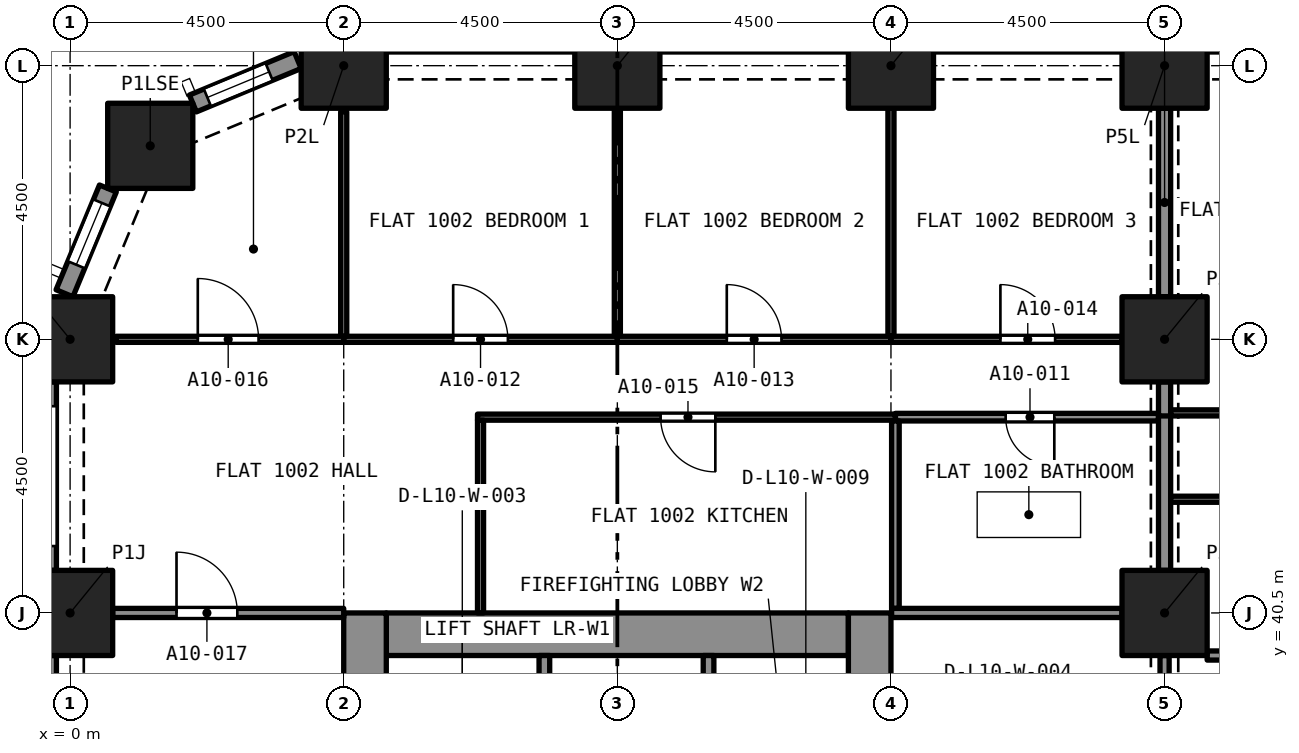
"""IFC4 building model, lengths in metres.
Left out: names, types, materials, properties, quantities, classifications, styles, units other than length and angle.
Written with IfcOpenShell. Run it as: python <this file> out.ifc"""

import sys

from ifc_helpers import new_model, si_unit, direction, frame, frame_2d, origin, origin_2d, place, context, subcontext, project, spatial, rectangle, extrude, element, fill, save


model = new_model("IFC4")
c1 = context("Model", 3, precision=1e-05, world=origin(), true_north=direction((0.0, 1.0)))
c2 = subcontext(c1, "Body", "Model", "MODEL_VIEW")
j1 = project(units=[si_unit("LENGTHUNIT", "METRE"), si_unit("PLANEANGLEUNIT", "RADIAN")], contexts=[c1])
p1 = place(None, origin())
s1 = spatial("IfcSite", under=j1, at=p1, CompositionType="ELEMENT")
p2 = place(p1, origin())
s2 = spatial("IfcBuilding", under=s1, at=p2, CompositionType="ELEMENT")
p3 = place(p2, frame((0.0, 0.0, 43.2)))
s3 = spatial("IfcBuildingStorey", under=s2, at=p3, CompositionType="ELEMENT", Elevation=43.2)
for number, where, z_axis, x_axis in (
    (1, (0.0, 40.5, 0.0), (0.0, 0.0, 1.0), (1.0, 0.0, 0.0)),
    (2, (18.0, 40.5, 0.0), (0.0, 0.0, 1.0), (1.0, 0.0, 0.0)),
    (3, (0.0, 45.0, 0.0), (0.0, 0.0, 1.0), (1.0, 0.0, 0.0)),
    (4, (18.0, 45.0, 0.0), (0.0, 0.0, 1.0), (1.0, 0.0, 0.0)),
    (5, (1.318, 48.182, 0.0), (0.0, 0.0, 1.0), (1.0, 0.0, 0.0)),
    (6, (4.5, 49.5, 0.0), (0.0, 0.0, 1.0), (1.0, 0.0, 0.0)),
    (7, (9.0, 49.5, 0.0), (0.0, 0.0, 1.0), (1.0, 0.0, 0.0)),
    (8, (13.5, 49.5, 0.0), (0.0, 0.0, 1.0), (1.0, 0.0, 0.0)),
    (9, (18.0, 49.5, 0.0), (0.0, 0.0, 1.0), (1.0, 0.0, 0.0)),
):
    element("IfcColumn", number, at=place(p3, frame(where, z_axis=z_axis, x_axis=x_axis)), inside=s3, PredefinedType="COLUMN", context=c2, shape_type="SweptSolid", body=[
        extrude(rectangle(XDim=1.4, YDim=1.4, at=origin_2d()), origin(), (0.0, 0.0, 1.0), 3.2),
    ])
p4 = place(p3, frame((5.2, 40.15, 0.0), z_axis=(0.0, 0.0, 1.0), x_axis=(1.0, 0.0, 0.0)))
e10 = element("IfcWall", 10, at=p4, inside=s3, PredefinedType="SOLIDWALL", context=c2, shape_type="SweptSolid", body=[
    extrude(rectangle(XDim=7.6, YDim=0.7, at=frame_2d((3.8, 0.0))), origin(), (0.0, 0.0, 1.0), 3.2),
])
p5 = place(p3, frame((4.85, 27.0, 0.0), z_axis=(0.0, 0.0, 1.0), x_axis=(0.0, 1.0, 0.0)))
e11 = element("IfcWall", 11, at=p5, inside=s3, PredefinedType="SOLIDWALL", context=c2, shape_type="SweptSolid", body=[
    extrude(rectangle(XDim=13.5, YDim=0.7, at=frame_2d((6.75, 0.0))), origin(), (0.0, 0.0, 1.0), 3.2),
])
p6 = place(p5, frame((8.95, 0.0, 0.0)))
e12 = element("IfcOpeningElement", 12, at=p6, cuts=e11, PredefinedType="OPENING", context=c2, shape_type="SweptSolid", body=[
    extrude(rectangle(XDim=1.2, YDim=2.1, at=frame_2d((0.6, 1.05))), frame((0.0, 0.36, 0.0), z_axis=(0.0, -1.0, 0.0), x_axis=(1.0, 0.0, 0.0)), (0.0, 0.0, 1.0), 0.72),
])
p7 = place(p3, frame((13.15, 27.0, 0.0), z_axis=(0.0, 0.0, 1.0), x_axis=(0.0, 1.0, 0.0)))
e13 = element("IfcWall", 13, at=p7, inside=s3, PredefinedType="SOLIDWALL", context=c2, shape_type="SweptSolid", body=[
    extrude(rectangle(XDim=13.5, YDim=0.7, at=frame_2d((6.75, 0.0))), origin(), (0.0, 0.0, 1.0), 3.2),
])
p8 = place(p7, frame((11.1, 0.0, 0.0)))
e14 = element("IfcOpeningElement", 14, at=p8, cuts=e13, PredefinedType="OPENING", context=c2, shape_type="SweptSolid", body=[
    extrude(rectangle(XDim=1.1, YDim=2.1, at=frame_2d((0.55, 1.05))), frame((0.0, 0.36, 0.0), z_axis=(0.0, -1.0, 0.0), x_axis=(1.0, 0.0, 0.0)), (0.0, 0.0, 1.0), 0.72),
])
p9 = place(p7, frame((8.95, 0.0, 0.0)))
e15 = element("IfcOpeningElement", 15, at=p9, cuts=e13, PredefinedType="OPENING", context=c2, shape_type="SweptSolid", body=[
    extrude(rectangle(XDim=1.2, YDim=2.1, at=frame_2d((0.6, 1.05))), frame((0.0, 0.36, 0.0), z_axis=(0.0, -1.0, 0.0), x_axis=(1.0, 0.0, 0.0)), (0.0, 0.0, 1.0), 0.72),
])
p10 = place(p3, frame((2.02, 48.878, 0.0), z_axis=(0.0, 0.0, 1.0), x_axis=(0.923903565336, 0.38262540684, 0.0)))
e16 = element("IfcWall", 16, at=p10, inside=s3, PredefinedType="SOLIDWALL", context=c2, shape_type="SweptSolid", body=[
    extrude(rectangle(XDim=1.865, YDim=0.3, at=frame_2d((0.933, 0.0))), origin(), (0.0, 0.0, 1.0), 3.2),
])
p11 = place(p10, frame((0.258, 0.0, 0.45)))
e17 = element("IfcOpeningElement", 17, at=p11, cuts=e16, PredefinedType="OPENING", context=c2, shape_type="SweptSolid", body=[
    extrude(rectangle(XDim=1.1, YDim=1.95, at=frame_2d((0.55, 0.975))), frame((0.0, 0.16, 0.0), z_axis=(0.0, -1.0, 0.0), x_axis=(1.0, 0.0, 0.0)), (0.0, 0.0, 1.0), 0.32),
])
p12 = place(p3, frame((-0.092, 45.757, 0.0), z_axis=(0.0, 0.0, 1.0), x_axis=(0.382737135771, 0.923857286003, 0.0)))
e18 = element("IfcWall", 18, at=p12, inside=s3, PredefinedType="SOLIDWALL", context=c2, shape_type="SweptSolid", body=[
    extrude(rectangle(XDim=1.865, YDim=0.3, at=frame_2d((0.933, 0.0))), origin(), (0.0, 0.0, 1.0), 3.2),
])
p13 = place(p12, frame((0.508, 0.0, 0.45)))
e19 = element("IfcOpeningElement", 19, at=p13, cuts=e18, PredefinedType="OPENING", context=c2, shape_type="SweptSolid", body=[
    extrude(rectangle(XDim=1.1, YDim=1.95, at=frame_2d((0.55, 0.975))), frame((0.0, 0.16, 0.0), z_axis=(0.0, -1.0, 0.0), x_axis=(1.0, 0.0, 0.0)), (0.0, 0.0, 1.0), 0.32),
])
p14 = place(p3, frame((-0.375, 41.2, 0.0), z_axis=(0.0, 0.0, 1.0), x_axis=(0.0, 1.0, 0.0)))
e20 = element("IfcWall", 20, at=p14, inside=s3, PredefinedType="SOLIDWALL", context=c2, shape_type="SweptSolid", body=[
    extrude(rectangle(XDim=3.1, YDim=0.3, at=frame_2d((1.55, 0.0))), origin(), (0.0, 0.0, 1.0), 3.2),
])
p15 = place(p14, frame((0.4, 0.0, 0.45)))
e21 = element("IfcOpeningElement", 21, at=p15, cuts=e20, PredefinedType="OPENING", context=c2, shape_type="SweptSolid", body=[
    extrude(rectangle(XDim=2.3, YDim=1.95, at=frame_2d((1.15, 0.975))), frame((0.0, 0.16, 0.0), z_axis=(0.0, -1.0, 0.0), x_axis=(1.0, 0.0, 0.0)), (0.0, 0.0, 1.0), 0.32),
])
p16 = place(p3, frame((-0.375, 36.7, 0.0), z_axis=(0.0, 0.0, 1.0), x_axis=(0.0, 1.0, 0.0)))
e22 = element("IfcWall", 22, at=p16, inside=s3, PredefinedType="SOLIDWALL", context=c2, shape_type="SweptSolid", body=[
    extrude(rectangle(XDim=3.1, YDim=0.3, at=frame_2d((1.55, 0.0))), origin(), (0.0, 0.0, 1.0), 3.2),
])
p17 = place(p16, frame((0.4, 0.0, 0.45)))
e23 = element("IfcOpeningElement", 23, at=p17, cuts=e22, PredefinedType="OPENING", context=c2, shape_type="SweptSolid", body=[
    extrude(rectangle(XDim=2.3, YDim=1.95, at=frame_2d((1.15, 0.975))), frame((0.0, 0.16, 0.0), z_axis=(0.0, -1.0, 0.0), x_axis=(1.0, 0.0, 0.0)), (0.0, 0.0, 1.0), 0.32),
])
p18 = place(p3, frame((17.9, 43.72, 0.0), z_axis=(0.0, 0.0, 1.0), x_axis=(-1.0, 0.0, 0.0)))
e24 = element("IfcWall", 24, at=p18, inside=s3, PredefinedType="PARTITIONING", context=c2, shape_type="SweptSolid", body=[
    extrude(rectangle(XDim=4.327, YDim=0.125, at=frame_2d((2.163, 0.0))), origin(), (0.0, 0.0, 1.0), 2.9),
])
p19 = place(p18, frame((1.713, 0.0, 0.0)))
e25 = element("IfcOpeningElement", 25, at=p19, cuts=e24, PredefinedType="OPENING", context=c2, shape_type="SweptSolid", body=[
    extrude(rectangle(XDim=0.8, YDim=2.1, at=frame_2d((0.4, 1.05))), frame((0.0, 0.073, 0.0), z_axis=(0.0, -1.0, 0.0), x_axis=(1.0, 0.0, 0.0)), (0.0, 0.0, 1.0), 0.145),
])
p20 = place(p3, frame((13.573, 40.575, 0.0), z_axis=(0.0, 0.0, 1.0), x_axis=(0.0, 1.0, 0.0)))
e26 = element("IfcWall", 26, at=p20, inside=s3, PredefinedType="PARTITIONING", context=c2, shape_type="SweptSolid", body=[
    extrude(rectangle(XDim=3.083, YDim=0.125, at=frame_2d((1.541, 0.0))), origin(), (0.0, 0.0, 1.0), 2.9),
])
p21 = place(p3, frame((18.0, 41.2, 0.0), z_axis=(0.0, 0.0, 1.0), x_axis=(0.0, 1.0, 0.0)))
e27 = element("IfcWall", 27, at=p21, inside=s3, PredefinedType="PARTITIONING", context=c2, shape_type="SweptSolid", body=[
    extrude(rectangle(XDim=2.583, YDim=0.2, at=frame_2d((1.291, 0.0))), origin(), (0.0, 0.0, 1.0), 2.38),
])
p22 = place(p3, frame((13.511, 40.5, 0.0), z_axis=(0.0, 0.0, 1.0), x_axis=(1.0, 0.0, 0.0)))
e28 = element("IfcWall", 28, at=p22, inside=s3, PredefinedType="PARTITIONING", context=c2, shape_type="SweptSolid", body=[
    extrude(rectangle(XDim=3.789, YDim=0.15, at=frame_2d((1.895, 0.0))), origin(), (0.0, 0.0, 1.0), 2.9),
])
p23 = place(p3, frame((9.0, 45.05, 0.0), z_axis=(0.0, 0.0, 1.0), x_axis=(0.0, 1.0, 0.0)))
e29 = element("IfcWall", 29, at=p23, inside=s3, PredefinedType="PARTITIONING", context=c2, shape_type="SweptSolid", body=[
    extrude(rectangle(XDim=3.75, YDim=0.1, at=frame_2d((1.875, 0.0))), origin(), (0.0, 0.0, 1.0), 2.9),
])
p24 = place(p3, frame((4.5, 45.0, 0.0), z_axis=(0.0, 0.0, 1.0), x_axis=(1.0, 0.0, 0.0)))
e30 = element("IfcWall", 30, at=p24, inside=s3, PredefinedType="PARTITIONING", context=c2, shape_type="SweptSolid", body=[
    extrude(rectangle(XDim=4.5, YDim=0.1, at=frame_2d((2.25, 0.0))), origin(), (0.0, 0.0, 1.0), 2.9),
])
p25 = place(p24, frame((1.8, 0.0, 0.0)))
e31 = element("IfcOpeningElement", 31, at=p25, cuts=e30, PredefinedType="OPENING", context=c2, shape_type="SweptSolid", body=[
    extrude(rectangle(XDim=0.9, YDim=2.1, at=frame_2d((0.45, 1.05))), frame((0.0, 0.06, 0.0), z_axis=(0.0, -1.0, 0.0), x_axis=(1.0, 0.0, 0.0)), (0.0, 0.0, 1.0), 0.12),
])
p26 = place(p3, frame((4.5, 45.05, 0.0), z_axis=(0.0, 0.0, 1.0), x_axis=(0.0, 1.0, 0.0)))
e32 = element("IfcWall", 32, at=p26, inside=s3, PredefinedType="PARTITIONING", context=c2, shape_type="SweptSolid", body=[
    extrude(rectangle(XDim=3.692, YDim=0.1, at=frame_2d((1.846, 0.0))), origin(), (0.0, 0.0, 1.0), 2.9),
])
p27 = place(p3, frame((13.5, 45.05, 0.0), z_axis=(0.0, 0.0, 1.0), x_axis=(0.0, 1.0, 0.0)))
e33 = element("IfcWall", 33, at=p27, inside=s3, PredefinedType="PARTITIONING", context=c2, shape_type="SweptSolid", body=[
    extrude(rectangle(XDim=3.75, YDim=0.1, at=frame_2d((1.875, 0.0))), origin(), (0.0, 0.0, 1.0), 2.9),
])
p28 = place(p3, frame((9.0, 45.0, 0.0), z_axis=(0.0, 0.0, 1.0), x_axis=(1.0, 0.0, 0.0)))
e34 = element("IfcWall", 34, at=p28, inside=s3, PredefinedType="PARTITIONING", context=c2, shape_type="SweptSolid", body=[
    extrude(rectangle(XDim=4.5, YDim=0.1, at=frame_2d((2.25, 0.0))), origin(), (0.0, 0.0, 1.0), 2.9),
])
p29 = place(p28, frame((1.8, 0.0, 0.0)))
e35 = element("IfcOpeningElement", 35, at=p29, cuts=e34, PredefinedType="OPENING", context=c2, shape_type="SweptSolid", body=[
    extrude(rectangle(XDim=0.9, YDim=2.1, at=frame_2d((0.45, 1.05))), frame((0.0, 0.06, 0.0), z_axis=(0.0, -1.0, 0.0), x_axis=(1.0, 0.0, 0.0)), (0.0, 0.0, 1.0), 0.12),
])
p30 = place(p3, frame((13.5, 45.0, 0.0), z_axis=(0.0, 0.0, 1.0), x_axis=(1.0, 0.0, 0.0)))
e36 = element("IfcWall", 36, at=p30, inside=s3, PredefinedType="PARTITIONING", context=c2, shape_type="SweptSolid", body=[
    extrude(rectangle(XDim=3.8, YDim=0.1, at=frame_2d((1.9, 0.0))), origin(), (0.0, 0.0, 1.0), 2.9),
])
p31 = place(p30, frame((1.8, 0.0, 0.0)))
e37 = element("IfcOpeningElement", 37, at=p31, cuts=e36, PredefinedType="OPENING", context=c2, shape_type="SweptSolid", body=[
    extrude(rectangle(XDim=0.9, YDim=2.1, at=frame_2d((0.45, 1.05))), frame((0.0, 0.06, 0.0), z_axis=(0.0, -1.0, 0.0), x_axis=(1.0, 0.0, 0.0)), (0.0, 0.0, 1.0), 0.12),
])
p32 = place(p3, frame((18.0, 45.7, 0.0), z_axis=(0.0, 0.0, 1.0), x_axis=(0.0, 1.0, 0.0)))
e38 = element("IfcWall", 38, at=p32, inside=s3, PredefinedType="PARTITIONING", context=c2, shape_type="SweptSolid", body=[
    extrude(rectangle(XDim=3.1, YDim=0.2, at=frame_2d((1.55, 0.0))), origin(), (0.0, 0.0, 1.0), 2.38),
])
p33 = place(p3, frame((13.573, 43.72, 0.0), z_axis=(0.0, 0.0, 1.0), x_axis=(-1.0, 0.0, 0.0)))
e39 = element("IfcWall", 39, at=p33, inside=s3, PredefinedType="PARTITIONING", context=c2, shape_type="SweptSolid", body=[
    extrude(rectangle(XDim=6.873, YDim=0.1, at=frame_2d((3.437, 0.0))), origin(), (0.0, 0.0, 1.0), 2.9),
])
p34 = place(p33, frame((2.962, 0.0, 0.0)))
e40 = element("IfcOpeningElement", 40, at=p34, cuts=e39, PredefinedType="OPENING", context=c2, shape_type="SweptSolid", body=[
    extrude(rectangle(XDim=0.9, YDim=2.1, at=frame_2d((0.45, 1.05))), frame((0.0, 0.06, 0.0), z_axis=(0.0, -1.0, 0.0), x_axis=(1.0, 0.0, 0.0)), (0.0, 0.0, 1.0), 0.12),
])
p35 = place(p3, frame((6.75, 40.5, 0.0), z_axis=(0.0, 0.0, 1.0), x_axis=(0.0, 1.0, 0.0)))
e41 = element("IfcWall", 41, at=p35, inside=s3, PredefinedType="PARTITIONING", context=c2, shape_type="SweptSolid", body=[
    extrude(rectangle(XDim=3.17, YDim=0.1, at=frame_2d((1.585, 0.0))), origin(), (0.0, 0.0, 1.0), 2.9),
])
p36 = place(p3, frame((0.758, 45.0, 0.0), z_axis=(0.0, 0.0, 1.0), x_axis=(1.0, 0.0, 0.0)))
e42 = element("IfcWall", 42, at=p36, inside=s3, PredefinedType="PARTITIONING", context=c2, shape_type="SweptSolid", body=[
    extrude(rectangle(XDim=3.742, YDim=0.1, at=frame_2d((1.871, 0.0))), origin(), (0.0, 0.0, 1.0), 2.9),
])
p37 = place(p36, frame((1.342, 0.0, 0.0)))
e43 = element("IfcOpeningElement", 43, at=p37, cuts=e42, PredefinedType="OPENING", context=c2, shape_type="SweptSolid", body=[
    extrude(rectangle(XDim=1.0, YDim=2.1, at=frame_2d((0.5, 1.05))), frame((0.0, 0.06, 0.0), z_axis=(0.0, -1.0, 0.0), x_axis=(1.0, 0.0, 0.0)), (0.0, 0.0, 1.0), 0.12),
])
p38 = place(p3, frame((18.0, 43.74, 0.0), z_axis=(0.0, 0.0, 1.0), x_axis=(0.0, 1.0, 0.0)))
e44 = element("IfcWall", 44, at=p38, inside=s3, PredefinedType="PARTITIONING", context=c2, shape_type="SweptSolid", body=[
    extrude(rectangle(XDim=0.56, YDim=0.2, at=frame_2d((0.28, 0.0))), origin(), (0.0, 0.0, 1.0), 2.38),
])
p39 = place(p3, frame((0.7, 40.5, 0.0), z_axis=(0.0, 0.0, 1.0), x_axis=(1.0, 0.0, 0.0)))
e45 = element("IfcWall", 45, at=p39, inside=s3, PredefinedType="PARTITIONING", context=c2, shape_type="SweptSolid", body=[
    extrude(rectangle(XDim=3.8, YDim=0.15, at=frame_2d((1.9, 0.0))), origin(), (0.0, 0.0, 1.0), 2.9),
])
p40 = place(p39, frame((1.05, 0.0, 0.0)))
e46 = element("IfcOpeningElement", 46, at=p40, cuts=e45, PredefinedType="OPENING", context=c2, shape_type="SweptSolid", body=[
    extrude(rectangle(XDim=1.0, YDim=2.1, at=frame_2d((0.5, 1.05))), frame((0.0, 0.085, 0.0), z_axis=(0.0, -1.0, 0.0), x_axis=(1.0, 0.0, 0.0)), (0.0, 0.0, 1.0), 0.17),
])
p41 = place(p3, frame((27.425, 42.37, 0.0), z_axis=(0.0, 0.0, 1.0), x_axis=(-1.0, 0.0, 0.0)))
e47 = element("IfcWall", 47, at=p41, inside=s3, PredefinedType="PARTITIONING", context=c2, shape_type="SweptSolid", body=[
    extrude(rectangle(XDim=9.325, YDim=0.1, at=frame_2d((4.663, 0.0))), origin(), (0.0, 0.0, 1.0), 2.75),
])
p42 = place(p41, frame((4.288, 0.0, 0.0)))
e48 = element("IfcOpeningElement", 48, at=p42, cuts=e47, PredefinedType="OPENING", context=c2, shape_type="SweptSolid", body=[
    extrude(rectangle(XDim=0.9, YDim=2.1, at=frame_2d((0.45, 1.05))), frame((0.0, 0.06, 0.0), z_axis=(0.0, -1.0, 0.0), x_axis=(1.0, 0.0, 0.0)), (0.0, 0.0, 1.0), 0.12),
])
p43 = place(p3, frame((18.1, 43.79, 0.0), z_axis=(0.0, 0.0, 1.0), x_axis=(1.0, 0.0, 0.0)))
e49 = element("IfcWall", 49, at=p43, inside=s3, PredefinedType="PARTITIONING", context=c2, shape_type="SweptSolid", body=[
    extrude(rectangle(XDim=4.4, YDim=0.1, at=frame_2d((2.2, 0.0))), origin(), (0.0, 0.0, 1.0), 2.75),
])
p44 = place(p43, frame((1.65, 0.0, 0.0)))
e50 = element("IfcOpeningElement", 50, at=p44, cuts=e49, PredefinedType="OPENING", context=c2, shape_type="SweptSolid", body=[
    extrude(rectangle(XDim=1.0, YDim=2.1, at=frame_2d((0.5, 1.05))), frame((0.0, 0.06, 0.0), z_axis=(0.0, -1.0, 0.0), x_axis=(1.0, 0.0, 0.0)), (0.0, 0.0, 1.0), 0.12),
])
p45 = place(p3, frame((18.7, 39.8, 0.0), z_axis=(0.0, 0.0, 1.0), x_axis=(1.0, 0.0, 0.0)))
e51 = element("IfcWall", 51, at=p45, inside=s3, PredefinedType="PARTITIONING", context=c2, shape_type="SweptSolid", body=[
    extrude(rectangle(XDim=8.675, YDim=0.15, at=frame_2d((4.337, 0.0))), origin(), (0.0, 0.0, 1.0), 2.75),
])
p46 = place(p3, frame((18.0, 39.8, 0.0), z_axis=(0.0, 0.0, 1.0), x_axis=(0.0, -1.0, 0.0)))
e52 = element("IfcWall", 52, at=p46, inside=s3, PredefinedType="PARTITIONING", context=c2, shape_type="SweptSolid", body=[
    extrude(rectangle(XDim=3.1, YDim=0.15, at=frame_2d((1.55, 0.0))), origin(), (0.0, 0.0, 1.0), 2.38),
])
p47 = place(p46, frame((0.95, 0.0, 0.0)))
e53 = element("IfcOpeningElement", 53, at=p47, cuts=e52, PredefinedType="OPENING", context=c2, shape_type="SweptSolid", body=[
    extrude(rectangle(XDim=1.2, YDim=2.1, at=frame_2d((0.6, 1.05))), frame((0.0, 0.085, 0.0), z_axis=(0.0, -1.0, 0.0), x_axis=(1.0, 0.0, 0.0)), (0.0, 0.0, 1.0), 0.17),
])
p48 = place(p3, frame((7.8, 37.5, 0.0), z_axis=(0.0, 0.0, 1.0), x_axis=(0.0, 1.0, 0.0)))
e54 = element("IfcWall", 54, at=p48, inside=s3, PredefinedType="SOLIDWALL", context=c2, shape_type="SweptSolid", body=[
    extrude(rectangle(XDim=2.3, YDim=0.175, at=frame_2d((1.15, 0.0))), origin(), (0.0, 0.0, 1.0), 2.9),
])
p49 = place(p3, frame((10.5, 37.5, 0.0), z_axis=(0.0, 0.0, 1.0), x_axis=(0.0, 1.0, 0.0)))
e55 = element("IfcWall", 55, at=p49, inside=s3, PredefinedType="SOLIDWALL", context=c2, shape_type="SweptSolid", body=[
    extrude(rectangle(XDim=2.3, YDim=0.175, at=frame_2d((1.15, 0.0))), origin(), (0.0, 0.0, 1.0), 2.9),
])
p50 = place(p49, frame((0.65, 0.0, 0.0)))
e56 = element("IfcOpeningElement", 56, at=p50, cuts=e55, PredefinedType="OPENING", context=c2, shape_type="SweptSolid", body=[
    extrude(rectangle(XDim=1.0, YDim=2.1, at=frame_2d((0.5, 1.05))), frame((0.0, 0.097, 0.0), z_axis=(0.0, -1.0, 0.0), x_axis=(1.0, 0.0, 0.0)), (0.0, 0.0, 1.0), 0.195),
])
p51 = place(p11, origin())
e57 = element("IfcWindow", 57, at=p51, inside=s3, PartitioningType="SINGLE_PANEL", PredefinedType="WINDOW", context=c2, shape_type="SweptSolid", body=[
    extrude(rectangle(XDim=1.1, YDim=1.95, at=frame_2d((0.55, 0.975))), frame((0.0, 0.03, 0.0), z_axis=(0.0, -1.0, 0.0), x_axis=(1.0, 0.0, 0.0)), (0.0, 0.0, 1.0), 0.06),
])
fill(e17, e57)
p52 = place(p13, origin())
e58 = element("IfcWindow", 58, at=p52, inside=s3, PartitioningType="SINGLE_PANEL", PredefinedType="WINDOW", context=c2, shape_type="SweptSolid", body=[
    extrude(rectangle(XDim=1.1, YDim=1.95, at=frame_2d((0.55, 0.975))), frame((0.0, 0.03, 0.0), z_axis=(0.0, -1.0, 0.0), x_axis=(1.0, 0.0, 0.0)), (0.0, 0.0, 1.0), 0.06),
])
fill(e19, e58)
p53 = place(p19, origin())
e59 = element("IfcDoor", 59, at=p53, inside=s3, OperationType="SINGLE_SWING_LEFT", PredefinedType="DOOR", context=c2, shape_type="SweptSolid", body=[
    extrude(rectangle(XDim=0.8, YDim=2.1, at=frame_2d((0.4, 1.05))), frame((0.0, 0.025, 0.0), z_axis=(0.0, -1.0, 0.0), x_axis=(1.0, 0.0, 0.0)), (0.0, 0.0, 1.0), 0.05),
])
fill(e25, e59)
p54 = place(p25, origin())
e60 = element("IfcDoor", 60, at=p54, inside=s3, OperationType="SINGLE_SWING_RIGHT", PredefinedType="DOOR", context=c2, shape_type="SweptSolid", body=[
    extrude(rectangle(XDim=0.9, YDim=2.1, at=frame_2d((0.45, 1.05))), frame((0.0, 0.025, 0.0), z_axis=(0.0, -1.0, 0.0), x_axis=(1.0, 0.0, 0.0)), (0.0, 0.0, 1.0), 0.05),
])
fill(e31, e60)
p55 = place(p29, origin())
e61 = element("IfcDoor", 61, at=p55, inside=s3, OperationType="SINGLE_SWING_LEFT", PredefinedType="DOOR", context=c2, shape_type="SweptSolid", body=[
    extrude(rectangle(XDim=0.9, YDim=2.1, at=frame_2d((0.45, 1.05))), frame((0.0, 0.025, 0.0), z_axis=(0.0, -1.0, 0.0), x_axis=(1.0, 0.0, 0.0)), (0.0, 0.0, 1.0), 0.05),
])
fill(e35, e61)
p56 = place(p31, origin())
e62 = element("IfcDoor", 62, at=p56, inside=s3, OperationType="SINGLE_SWING_RIGHT", PredefinedType="DOOR", context=c2, shape_type="SweptSolid", body=[
    extrude(rectangle(XDim=0.9, YDim=2.1, at=frame_2d((0.45, 1.05))), frame((0.0, 0.025, 0.0), z_axis=(0.0, -1.0, 0.0), x_axis=(1.0, 0.0, 0.0)), (0.0, 0.0, 1.0), 0.05),
])
fill(e37, e62)
p57 = place(p34, origin())
e63 = element("IfcDoor", 63, at=p57, inside=s3, OperationType="SINGLE_SWING_LEFT", PredefinedType="DOOR", context=c2, shape_type="SweptSolid", body=[
    extrude(rectangle(XDim=0.9, YDim=2.1, at=frame_2d((0.45, 1.05))), frame((0.0, 0.025, 0.0), z_axis=(0.0, -1.0, 0.0), x_axis=(1.0, 0.0, 0.0)), (0.0, 0.0, 1.0), 0.05),
])
fill(e40, e63)
p58 = place(p37, origin())
e64 = element("IfcDoor", 64, at=p58, inside=s3, OperationType="SINGLE_SWING_LEFT", PredefinedType="DOOR", context=c2, shape_type="SweptSolid", body=[
    extrude(rectangle(XDim=1.0, YDim=2.1, at=frame_2d((0.5, 1.05))), frame((0.0, 0.025, 0.0), z_axis=(0.0, -1.0, 0.0), x_axis=(1.0, 0.0, 0.0)), (0.0, 0.0, 1.0), 0.05),
])
fill(e43, e64)
p59 = place(p40, origin())
e65 = element("IfcDoor", 65, at=p59, inside=s3, OperationType="SINGLE_SWING_LEFT", PredefinedType="DOOR", context=c2, shape_type="SweptSolid", body=[
    extrude(rectangle(XDim=1.0, YDim=2.1, at=frame_2d((0.5, 1.05))), frame((0.0, 0.025, 0.0), z_axis=(0.0, -1.0, 0.0), x_axis=(1.0, 0.0, 0.0)), (0.0, 0.0, 1.0), 0.05),
])
fill(e46, e65)
save(model, sys.argv[1])
